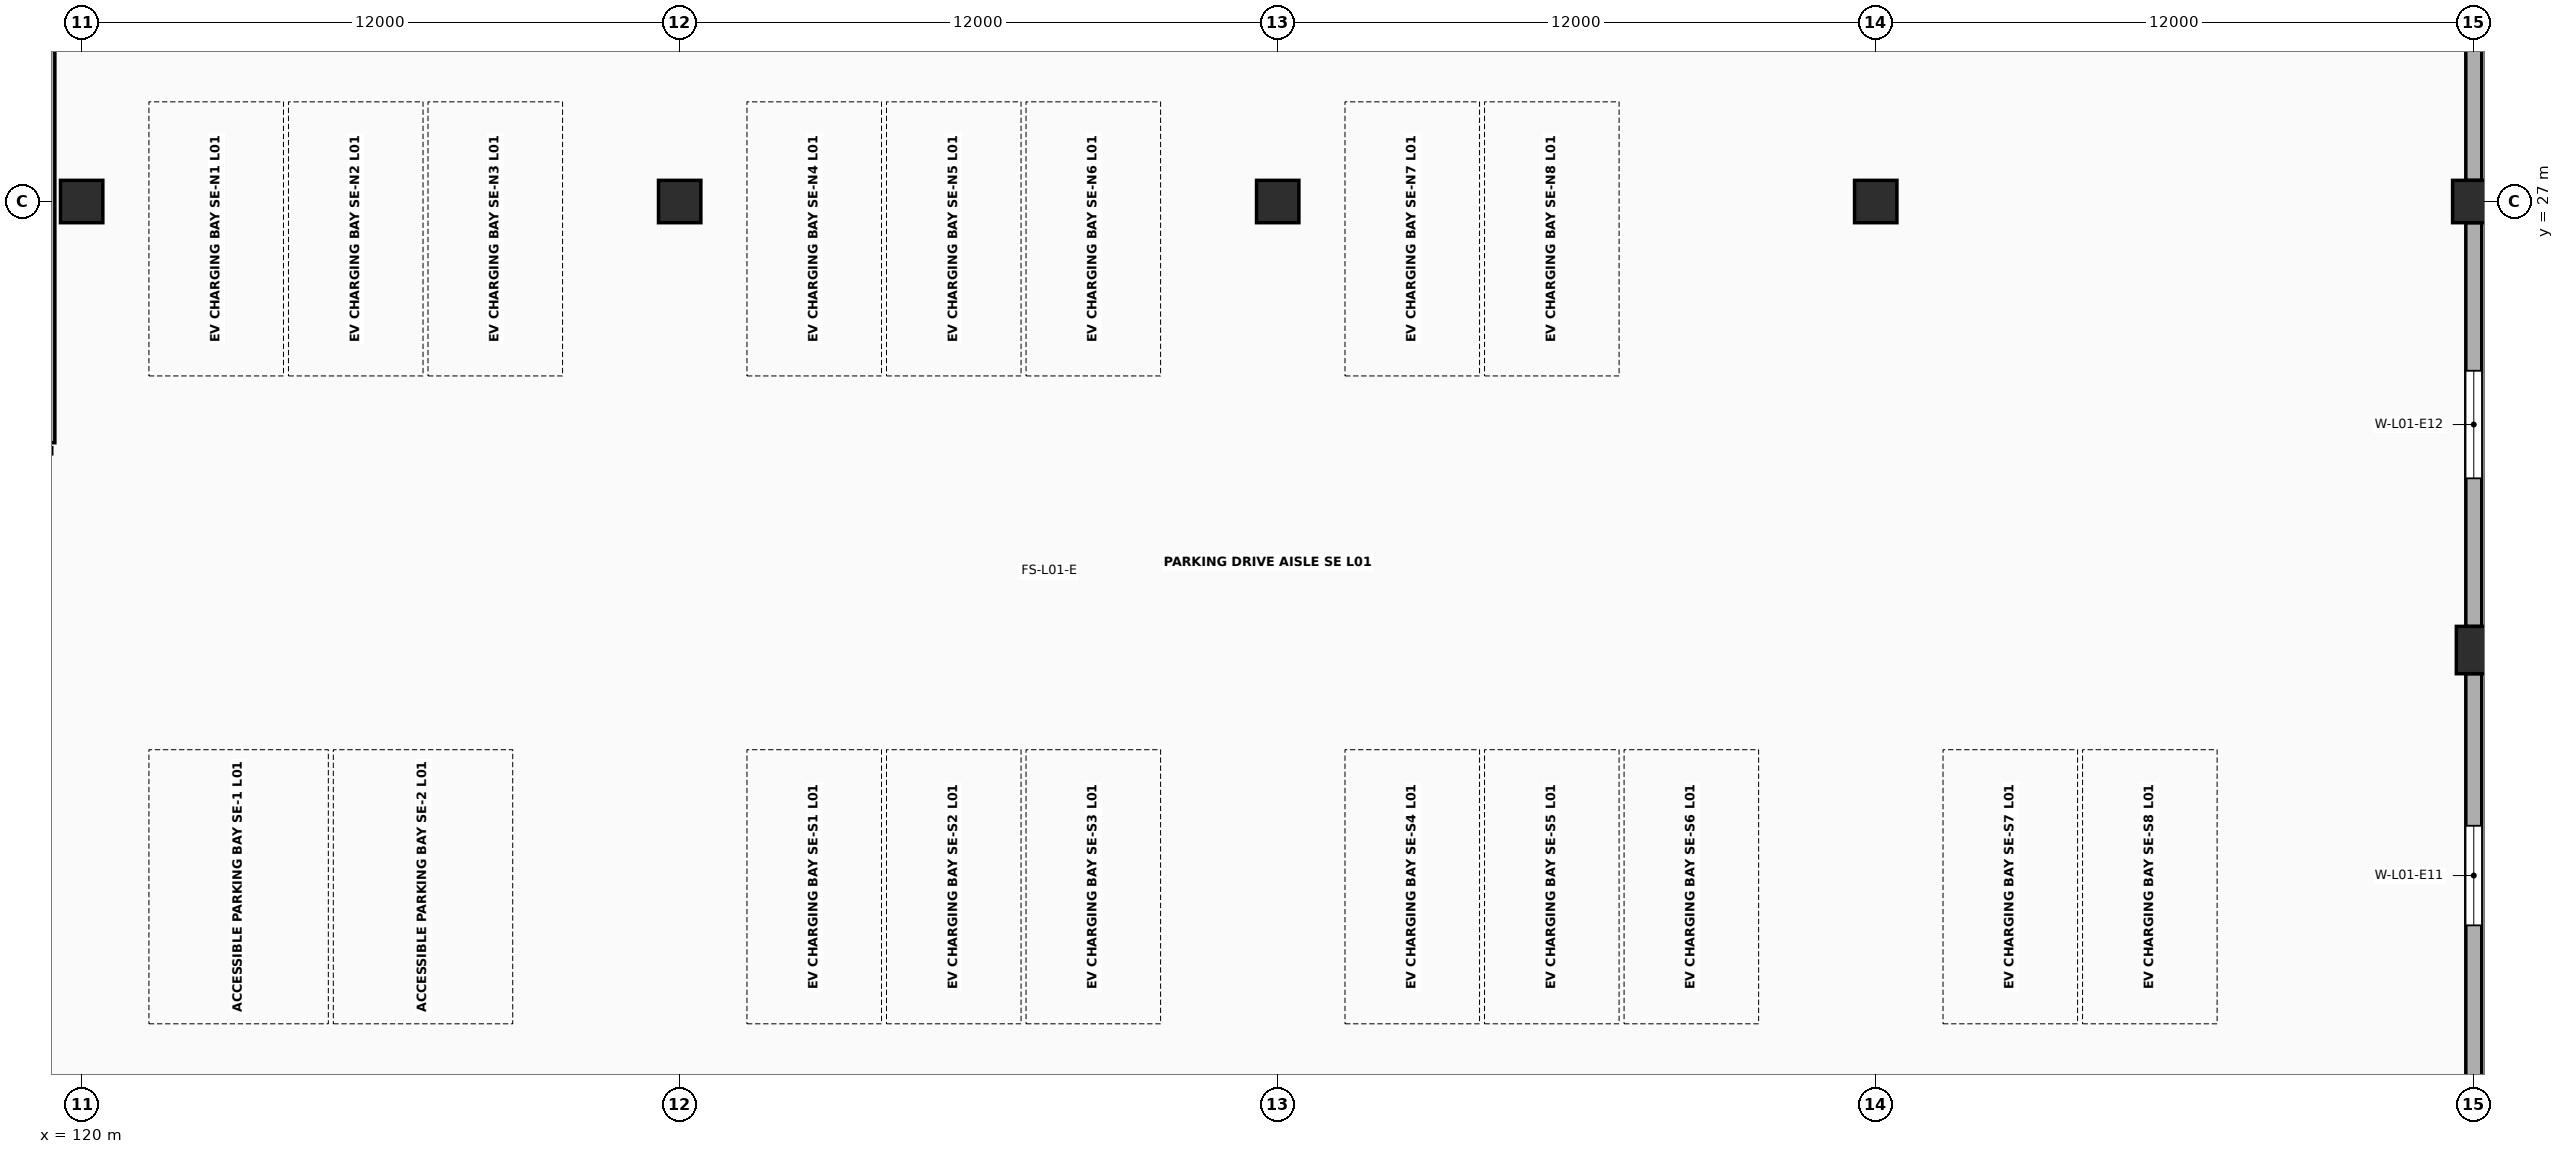
"""IFC4 building model, lengths in metres.
Left out: names, types, materials, properties, quantities, classifications, styles, units other than length and angle.
Written with IfcOpenShell. Run it as: python <this file> out.ifc"""

import sys

from ifc_helpers import new_model, si_unit, direction, frame, frame_2d, origin, origin_2d, place, context, subcontext, project, spatial, rectangle, extrude, element, fill, save


model = new_model("IFC4")
c1 = context("Model", 3, precision=1e-05, world=origin(), true_north=direction((0.0, 1.0)))
c2 = subcontext(c1, "Body", "Model", "MODEL_VIEW")
j1 = project(units=[si_unit("LENGTHUNIT", "METRE"), si_unit("PLANEANGLEUNIT", "RADIAN")], contexts=[c1])
p1 = place(None, origin())
s1 = spatial("IfcSite", under=j1, at=p1, CompositionType="ELEMENT")
p2 = place(p1, origin())
s2 = spatial("IfcBuilding", under=s1, at=p2, CompositionType="ELEMENT")
p3 = place(p2, frame((0.0, 0.0, 5.4)))
s3 = spatial("IfcBuildingStorey", under=s2, at=p3, CompositionType="ELEMENT", Elevation=5.4)
for number, where, z_axis, x_axis in (
    (1, (120.0, 27.0, 0.0), (0.0, 0.0, 1.0), (1.0, 0.0, 0.0)),
    (2, (132.0, 27.0, 0.0), (0.0, 0.0, 1.0), (1.0, 0.0, 0.0)),
    (3, (144.0, 27.0, 0.0), (0.0, 0.0, 1.0), (1.0, 0.0, 0.0)),
    (4, (156.0, 27.0, 0.0), (0.0, 0.0, 1.0), (1.0, 0.0, 0.0)),
    (5, (168.0, 27.0, 0.0), (0.0, 0.0, 1.0), (1.0, 0.0, 0.0)),
):
    element("IfcColumn", number, at=place(p3, frame(where, z_axis=z_axis, x_axis=x_axis)), inside=s3, PredefinedType="COLUMN", context=c2, shape_type="SweptSolid", body=[
        extrude(rectangle(XDim=0.85, YDim=0.85, at=origin_2d()), origin(), (0.0, 0.0, 1.0), 4.2),
    ])
p4 = place(p3, frame((168.0, 18.0, 0.0), z_axis=(0.0, 0.0, 1.0), x_axis=(1.0, 0.0, 0.0)))
e6 = element("IfcColumn", 6, at=p4, inside=s3, PredefinedType="PILASTER", context=c2, shape_type="SweptSolid", body=[
    extrude(rectangle(XDim=0.7, YDim=0.95, at=origin_2d()), origin(), (0.0, 0.0, 1.0), 4.2),
])
p5 = place(p3, frame((168.0, 9.423, 0.0), z_axis=(0.0, 0.0, 1.0), x_axis=(0.0, 1.0, 0.0)))
e7 = element("IfcWall", 7, at=p5, inside=s3, PredefinedType="SOLIDWALL", context=c2, shape_type="SweptSolid", body=[
    extrude(rectangle(XDim=8.104, YDim=0.32, at=frame_2d((4.052, 0.0))), origin(), (0.0, 0.0, 1.0), 2.69),
])
p6 = place(p5, frame((3.052, 0.0, 0.55)))
e8 = element("IfcOpeningElement", 8, at=p6, cuts=e7, PredefinedType="OPENING", context=c2, shape_type="SweptSolid", body=[
    extrude(rectangle(XDim=2.0, YDim=1.42, at=frame_2d((1.0, 0.71))), frame((0.0, 0.175, 0.0), z_axis=(0.0, -1.0, 0.0), x_axis=(1.0, 0.0, 0.0)), (0.0, 0.0, 1.0), 0.35),
])
p7 = place(p3, frame((168.0, 18.473, 0.0), z_axis=(0.0, 0.0, 1.0), x_axis=(0.0, 1.0, 0.0)))
e9 = element("IfcWall", 9, at=p7, inside=s3, PredefinedType="SOLIDWALL", context=c2, shape_type="SweptSolid", body=[
    extrude(rectangle(XDim=8.104, YDim=0.32, at=frame_2d((4.052, 0.0))), origin(), (0.0, 0.0, 1.0), 2.69),
])
p8 = place(p7, frame((2.972, 0.0, 0.55)))
e10 = element("IfcOpeningElement", 10, at=p8, cuts=e9, PredefinedType="OPENING", context=c2, shape_type="SweptSolid", body=[
    extrude(rectangle(XDim=2.16, YDim=1.42, at=frame_2d((1.08, 0.71))), frame((0.0, 0.175, 0.0), z_axis=(0.0, -1.0, 0.0), x_axis=(1.0, 0.0, 0.0)), (0.0, 0.0, 1.0), 0.35),
])
p9 = place(p3, frame((168.0, 27.423, 0.0), z_axis=(0.0, 0.0, 1.0), x_axis=(0.0, 1.0, 0.0)))
e11 = element("IfcWall", 11, at=p9, inside=s3, PredefinedType="SOLIDWALL", context=c2, shape_type="SweptSolid", body=[
    extrude(rectangle(XDim=8.104, YDim=0.32, at=frame_2d((4.052, 0.0))), origin(), (0.0, 0.0, 1.0), 2.69),
])
p10 = place(p9, frame((2.892, 0.0, 0.55)))
e12 = element("IfcOpeningElement", 12, at=p10, cuts=e11, PredefinedType="OPENING", context=c2, shape_type="SweptSolid", body=[
    extrude(rectangle(XDim=2.32, YDim=1.42, at=frame_2d((1.16, 0.71))), frame((0.0, 0.175, 0.0), z_axis=(0.0, -1.0, 0.0), x_axis=(1.0, 0.0, 0.0)), (0.0, 0.0, 1.0), 0.35),
])
p11 = place(p3, frame((119.4, 22.16, 0.0), z_axis=(0.0, 0.0, 1.0), x_axis=(0.0, 1.0, 0.0)))
e13 = element("IfcWall", 13, at=p11, inside=s3, PredefinedType="PARTITIONING", context=c2, shape_type="SweptSolid", body=[
    extrude(rectangle(XDim=16.68, YDim=0.125, at=frame_2d((8.34, 0.0))), origin(), (0.0, 0.0, 1.0), 2.75),
])
p12 = place(p6, origin())
e14 = element("IfcWindow", 14, at=p12, inside=s3, PartitioningType="DOUBLE_PANEL_VERTICAL", PredefinedType="WINDOW", context=c2, shape_type="SweptSolid", body=[
    extrude(rectangle(XDim=2.0, YDim=1.42, at=frame_2d((1.0, 0.71))), frame((0.0, 0.03, 0.0), z_axis=(0.0, -1.0, 0.0), x_axis=(1.0, 0.0, 0.0)), (0.0, 0.0, 1.0), 0.06),
])
fill(e8, e14)
p13 = place(p8, origin())
e15 = element("IfcWindow", 15, at=p13, inside=s3, PartitioningType="DOUBLE_PANEL_VERTICAL", PredefinedType="WINDOW", context=c2, shape_type="SweptSolid", body=[
    extrude(rectangle(XDim=2.16, YDim=1.42, at=frame_2d((1.08, 0.71))), frame((0.0, 0.03, 0.0), z_axis=(0.0, -1.0, 0.0), x_axis=(1.0, 0.0, 0.0)), (0.0, 0.0, 1.0), 0.06),
])
fill(e10, e15)
save(model, sys.argv[1])
